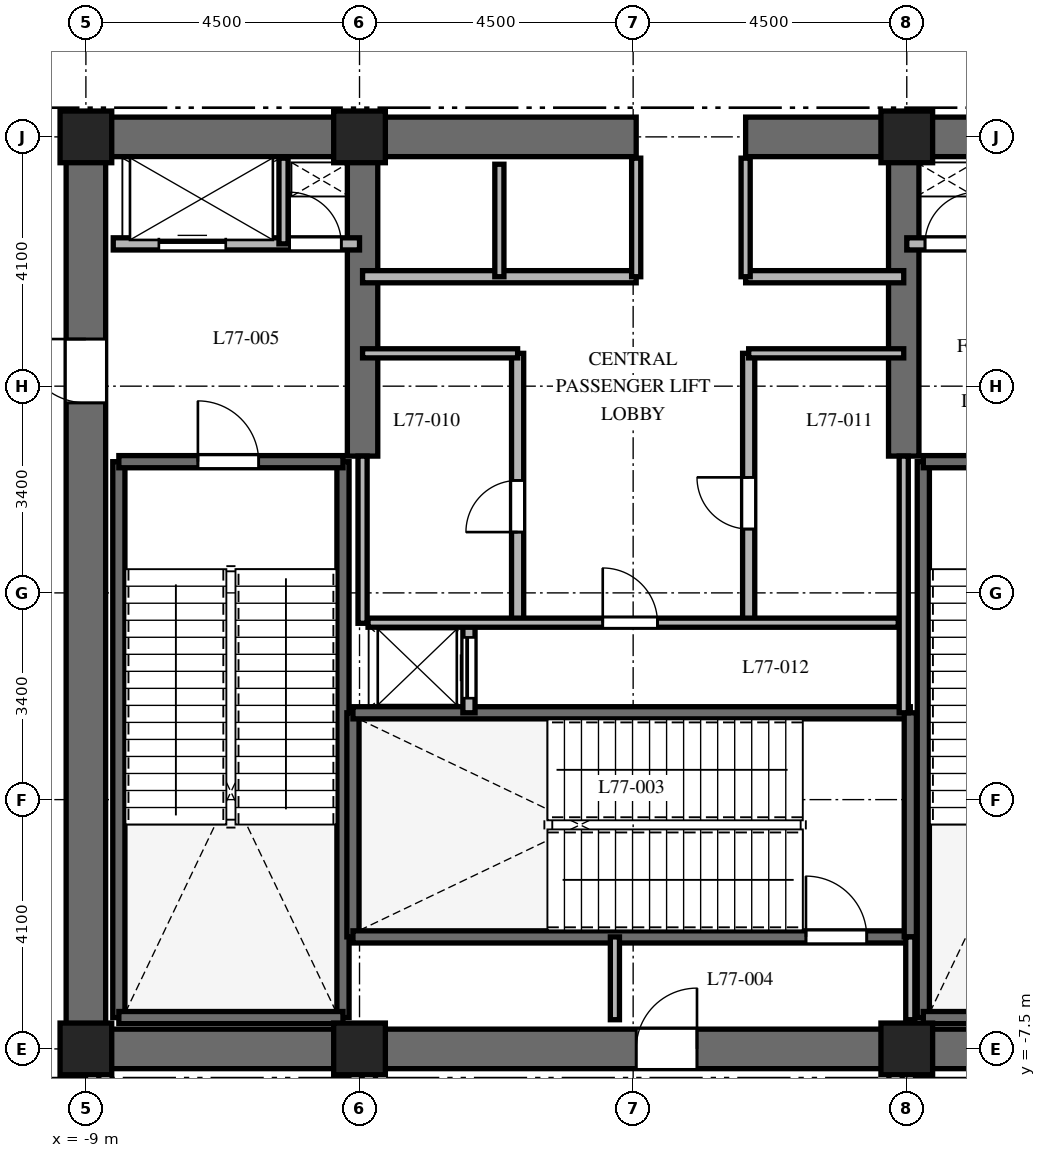
"""IFC4 building model, lengths in metres.
Left out: names, types, materials, properties, quantities, classifications, styles, units other than length and angle.
Written with IfcOpenShell. Run it as: python <this file> out.ifc"""

import sys

from ifc_helpers import new_model, si_unit, direction, frame, frame_2d, origin, origin_2d, place, context, subcontext, project, spatial, rectangle, extrude, element, fill, save


model = new_model("IFC4")
c1 = context("Model", 3, precision=1e-05, world=origin(), true_north=direction((0.0, 1.0)))
c2 = subcontext(c1, "Body", "Model", "MODEL_VIEW")
j1 = project(units=[si_unit("LENGTHUNIT", "METRE"), si_unit("PLANEANGLEUNIT", "RADIAN")], contexts=[c1])
p1 = place(None, origin())
s1 = spatial("IfcSite", under=j1, at=p1, CompositionType="ELEMENT")
p2 = place(p1, origin())
s2 = spatial("IfcBuilding", under=s1, at=p2, CompositionType="ELEMENT")
p3 = place(p2, frame((0.0, 0.0, 310.4)))
s3 = spatial("IfcBuildingStorey", under=s2, at=p3, CompositionType="ELEMENT", Elevation=310.4)
p4 = place(p3, frame((-9.325, -7.5, 0.0), z_axis=(0.0, 0.0, 1.0), x_axis=(1.0, 0.0, 0.0)))
e1 = element("IfcWall", 1, at=p4, inside=s3, PredefinedType="SHEAR", context=c2, shape_type="SweptSolid", body=[
    extrude(rectangle(XDim=18.65, YDim=0.65, at=frame_2d((9.325, 0.0))), origin(), (0.0, 0.0, 1.0), 5.5),
])
p5 = place(p4, frame((9.375, 0.0, 0.0)))
e2 = element("IfcOpeningElement", 2, at=p5, cuts=e1, PredefinedType="OPENING", context=c2, shape_type="SweptSolid", body=[
    extrude(rectangle(XDim=1.0, YDim=2.15, at=frame_2d((0.5, 1.075))), frame((0.0, 0.335, 0.0), z_axis=(0.0, -1.0, 0.0), x_axis=(1.0, 0.0, 0.0)), (0.0, 0.0, 1.0), 0.67),
])
p6 = place(p3, frame((-9.325, 7.5, 0.0), z_axis=(0.0, 0.0, 1.0), x_axis=(1.0, 0.0, 0.0)))
e3 = element("IfcWall", 3, at=p6, inside=s3, PredefinedType="SHEAR", context=c2, shape_type="SweptSolid", body=[
    extrude(rectangle(XDim=9.375, YDim=0.65, at=frame_2d((4.688, 0.0))), origin(), (0.0, 0.0, 1.0), 5.5),
])
p7 = place(p3, frame((1.85, 7.5, 0.0), z_axis=(0.0, 0.0, 1.0), x_axis=(1.0, 0.0, 0.0)))
e4 = element("IfcWall", 4, at=p7, inside=s3, PredefinedType="SHEAR", context=c2, shape_type="SweptSolid", body=[
    extrude(rectangle(XDim=7.475, YDim=0.65, at=frame_2d((3.737, 0.0))), origin(), (0.0, 0.0, 1.0), 5.5),
])
p8 = place(p3, frame((-9.0, -7.175, 0.0), z_axis=(0.0, 0.0, 1.0), x_axis=(0.0, 1.0, 0.0)))
e5 = element("IfcWall", 5, at=p8, inside=s3, PredefinedType="SHEAR", context=c2, shape_type="SweptSolid", body=[
    extrude(rectangle(XDim=14.35, YDim=0.65, at=frame_2d((7.175, 0.0))), origin(), (0.0, 0.0, 1.0), 5.5),
])
p9 = place(p8, frame((10.3, 0.0, 0.0)))
e6 = element("IfcOpeningElement", 6, at=p9, cuts=e5, PredefinedType="OPENING", context=c2, shape_type="SweptSolid", body=[
    extrude(rectangle(XDim=1.05, YDim=2.15, at=frame_2d((0.525, 1.075))), frame((0.0, 0.335, 0.0), z_axis=(0.0, -1.0, 0.0), x_axis=(1.0, 0.0, 0.0)), (0.0, 0.0, 1.0), 0.67),
])
for number, where, z_axis, x_axis in (
    (7, (-4.45, 2.25, 0.0), (0.0, 0.0, 1.0), (0.0, 1.0, 0.0)),
    (8, (4.45, 2.25, 0.0), (0.0, 0.0, 1.0), (0.0, 1.0, 0.0)),
):
    element("IfcWall", number, at=place(p3, frame(where, z_axis=z_axis, x_axis=x_axis)), inside=s3, PredefinedType="SHEAR", context=c2, shape_type="SweptSolid", body=[
        extrude(rectangle(XDim=4.925, YDim=0.5, at=frame_2d((2.462, 0.0))), origin(), (0.0, 0.0, 1.0), 5.5),
    ])
for number, where, z_axis, x_axis in (
    (9, (-8.458, -6.985, 0.0), (0.0, 0.0, 1.0), (0.0, 1.0, 0.0)),
    (10, (-4.772, -6.985, 0.0), (0.0, 0.0, 1.0), (0.0, 1.0, 0.0)),
):
    element("IfcWall", number, at=place(p3, frame(where, z_axis=z_axis, x_axis=x_axis)), inside=s3, PredefinedType="SHEAR", context=c2, shape_type="SweptSolid", body=[
        extrude(rectangle(XDim=9.143, YDim=0.2, at=frame_2d((4.572, 0.0))), origin(), (0.0, 0.0, 1.0), 5.5),
    ])
p10 = place(p3, frame((-8.458, -6.985, 0.0), z_axis=(0.0, 0.0, 1.0), x_axis=(1.0, 0.0, 0.0)))
e11 = element("IfcWall", 11, at=p10, inside=s3, PredefinedType="SHEAR", context=c2, shape_type="SweptSolid", body=[
    extrude(rectangle(XDim=3.686, YDim=0.2, at=frame_2d((1.843, 0.0))), origin(), (0.0, 0.0, 1.0), 5.5),
])
p11 = place(p3, frame((-8.458, 2.158, 0.0), z_axis=(0.0, 0.0, 1.0), x_axis=(1.0, 0.0, 0.0)))
e12 = element("IfcWall", 12, at=p11, inside=s3, PredefinedType="SHEAR", context=c2, shape_type="SweptSolid", body=[
    extrude(rectangle(XDim=3.686, YDim=0.2, at=frame_2d((1.843, 0.0))), origin(), (0.0, 0.0, 1.0), 5.5),
])
p12 = place(p11, frame((1.3, 0.0, 0.0)))
e13 = element("IfcOpeningElement", 13, at=p12, cuts=e12, PredefinedType="OPENING", context=c2, shape_type="SweptSolid", body=[
    extrude(rectangle(XDim=1.0, YDim=2.15, at=frame_2d((0.5, 1.075))), frame((0.0, 0.11, 0.0), z_axis=(0.0, -1.0, 0.0), x_axis=(1.0, 0.0, 0.0)), (0.0, 0.0, 1.0), 0.22),
])
p13 = place(p3, frame((4.772, -6.985, 0.0), z_axis=(0.0, 0.0, 1.0), x_axis=(0.0, 1.0, 0.0)))
e14 = element("IfcWall", 14, at=p13, inside=s3, PredefinedType="SHEAR", context=c2, shape_type="SweptSolid", body=[
    extrude(rectangle(XDim=9.143, YDim=0.2, at=frame_2d((4.572, 0.0))), origin(), (0.0, 0.0, 1.0), 5.5),
])
p14 = place(p3, frame((4.772, -6.985, 0.0), z_axis=(0.0, 0.0, 1.0), x_axis=(1.0, 0.0, 0.0)))
e15 = element("IfcWall", 15, at=p14, inside=s3, PredefinedType="SHEAR", context=c2, shape_type="SweptSolid", body=[
    extrude(rectangle(XDim=3.686, YDim=0.2, at=frame_2d((1.843, 0.0))), origin(), (0.0, 0.0, 1.0), 5.5),
])
p15 = place(p3, frame((4.772, 2.158, 0.0), z_axis=(0.0, 0.0, 1.0), x_axis=(1.0, 0.0, 0.0)))
e16 = element("IfcWall", 16, at=p15, inside=s3, PredefinedType="SHEAR", context=c2, shape_type="SweptSolid", body=[
    extrude(rectangle(XDim=3.686, YDim=0.2, at=frame_2d((1.843, 0.0))), origin(), (0.0, 0.0, 1.0), 5.5),
])
p16 = place(p15, frame((1.35, 0.0, 0.0)))
e17 = element("IfcOpeningElement", 17, at=p16, cuts=e16, PredefinedType="OPENING", context=c2, shape_type="SweptSolid", body=[
    extrude(rectangle(XDim=1.0, YDim=2.15, at=frame_2d((0.5, 1.075))), frame((0.0, 0.11, 0.0), z_axis=(0.0, -1.0, 0.0), x_axis=(1.0, 0.0, 0.0)), (0.0, 0.0, 1.0), 0.22),
])
p17 = place(p3, frame((-4.608, -5.658, 0.0), z_axis=(0.0, 0.0, 1.0), x_axis=(0.0, 1.0, 0.0)))
e18 = element("IfcWall", 18, at=p17, inside=s3, PredefinedType="SHEAR", context=c2, shape_type="SweptSolid", body=[
    extrude(rectangle(XDim=3.686, YDim=0.2, at=frame_2d((1.843, 0.0))), origin(), (0.0, 0.0, 1.0), 5.5),
])
p18 = place(p3, frame((-4.608, -5.658, 0.0), z_axis=(0.0, 0.0, 1.0), x_axis=(1.0, 0.0, 0.0)))
e19 = element("IfcWall", 19, at=p18, inside=s3, PredefinedType="SHEAR", context=c2, shape_type="SweptSolid", body=[
    extrude(rectangle(XDim=9.166, YDim=0.2, at=frame_2d((4.583, 0.0))), origin(), (0.0, 0.0, 1.0), 5.5),
])
p19 = place(p18, frame((7.45, 0.0, 0.0)))
e20 = element("IfcOpeningElement", 20, at=p19, cuts=e19, PredefinedType="OPENING", context=c2, shape_type="SweptSolid", body=[
    extrude(rectangle(XDim=1.0, YDim=2.15, at=frame_2d((0.5, 1.075))), frame((0.0, 0.11, 0.0), z_axis=(0.0, -1.0, 0.0), x_axis=(1.0, 0.0, 0.0)), (0.0, 0.0, 1.0), 0.22),
])
p20 = place(p3, frame((-4.608, -1.972, 0.0), z_axis=(0.0, 0.0, 1.0), x_axis=(1.0, 0.0, 0.0)))
e21 = element("IfcWall", 21, at=p20, inside=s3, PredefinedType="SHEAR", context=c2, shape_type="SweptSolid", body=[
    extrude(rectangle(XDim=9.166, YDim=0.2, at=frame_2d((4.583, 0.0))), origin(), (0.0, 0.0, 1.0), 5.5),
])
p21 = place(p3, frame((4.558, -5.658, 0.0), z_axis=(0.0, 0.0, 1.0), x_axis=(0.0, 1.0, 0.0)))
e22 = element("IfcWall", 22, at=p21, inside=s3, PredefinedType="SHEAR", context=c2, shape_type="SweptSolid", body=[
    extrude(rectangle(XDim=3.686, YDim=0.2, at=frame_2d((1.843, 0.0))), origin(), (0.0, 0.0, 1.0), 5.5),
])
for number, where, z_axis, x_axis in (
    (23, (-9.0, -7.5, 0.0), (0.0, 0.0, 1.0), (1.0, 0.0, 0.0)),
    (24, (-4.5, -7.5, 0.0), (0.0, 0.0, 1.0), (1.0, 0.0, 0.0)),
    (25, (4.5, -7.5, 0.0), (0.0, 0.0, 1.0), (1.0, 0.0, 0.0)),
    (26, (4.5, 7.5, 0.0), (0.0, 0.0, 1.0), (1.0, 0.0, 0.0)),
    (27, (-4.5, 7.5, 0.0), (0.0, 0.0, 1.0), (1.0, 0.0, 0.0)),
    (28, (-9.0, 7.5, 0.0), (0.0, 0.0, 1.0), (1.0, 0.0, 0.0)),
):
    element("IfcColumn", number, at=place(p3, frame(where, z_axis=z_axis, x_axis=x_axis)), inside=s3, PredefinedType="COLUMN", context=c2, shape_type="SweptSolid", body=[
        extrude(rectangle(XDim=0.85, YDim=0.85, at=origin_2d()), origin(), (0.0, 0.0, 1.0), 5.5),
    ])
for number, where, z_axis, x_axis in (
    (29, (-0.3, -7.02, 0.0), (0.0, 0.0, 1.0), (0.0, 1.0, 0.0)),
    (30, (4.558, -7.02, 0.0), (0.0, 0.0, 1.0), (0.0, 1.0, 0.0)),
):
    element("IfcWall", number, at=place(p3, frame(where, z_axis=z_axis, x_axis=x_axis)), inside=s3, PredefinedType="PARTITIONING", context=c2, shape_type="SweptSolid", body=[
        extrude(rectangle(XDim=1.362, YDim=0.15, at=frame_2d((0.681, 0.0))), origin(), (0.0, 0.0, 1.0), 5.18),
    ])
p22 = place(p3, frame((-8.55, 5.74, 0.0), z_axis=(0.0, 0.0, 1.0), x_axis=(1.0, 0.0, 0.0)))
e31 = element("IfcWall", 31, at=p22, inside=s3, PredefinedType="PARTITIONING", context=c2, shape_type="SweptSolid", body=[
    extrude(rectangle(XDim=4.05, YDim=0.2, at=frame_2d((2.025, 0.0))), origin(), (0.0, 0.0, 1.0), 5.18),
])
p23 = place(p22, frame((0.75, 0.0, 0.0)))
e32 = element("IfcOpeningElement", 32, at=p23, cuts=e31, PredefinedType="OPENING", context=c2, shape_type="SweptSolid", body=[
    extrude(rectangle(XDim=1.1, YDim=2.2, at=frame_2d((0.55, 1.1))), frame((0.0, 0.11, 0.0), z_axis=(0.0, -1.0, 0.0), x_axis=(1.0, 0.0, 0.0)), (0.0, 0.0, 1.0), 0.22),
])
p24 = place(p22, frame((2.9, 0.0, 0.0)))
e33 = element("IfcOpeningElement", 33, at=p24, cuts=e31, PredefinedType="OPENING", context=c2, shape_type="SweptSolid", body=[
    extrude(rectangle(XDim=0.85, YDim=2.03, at=frame_2d((0.425, 1.015))), frame((0.0, 0.11, 0.0), z_axis=(0.0, -1.0, 0.0), x_axis=(1.0, 0.0, 0.0)), (0.0, 0.0, 1.0), 0.22),
])
p25 = place(p3, frame((-5.75, 5.74, 0.0), z_axis=(0.0, 0.0, 1.0), x_axis=(0.0, 1.0, 0.0)))
e34 = element("IfcWall", 34, at=p25, inside=s3, PredefinedType="PARTITIONING", context=c2, shape_type="SweptSolid", body=[
    extrude(rectangle(XDim=1.41, YDim=0.15, at=frame_2d((0.705, 0.0))), origin(), (0.0, 0.0, 1.0), 5.18),
])
p26 = place(p3, frame((4.5, 5.74, 0.0), z_axis=(0.0, 0.0, 1.0), x_axis=(1.0, 0.0, 0.0)))
e35 = element("IfcWall", 35, at=p26, inside=s3, PredefinedType="PARTITIONING", context=c2, shape_type="SweptSolid", body=[
    extrude(rectangle(XDim=4.05, YDim=0.2, at=frame_2d((2.025, 0.0))), origin(), (0.0, 0.0, 1.0), 5.18),
])
p27 = place(p26, frame((0.3, 0.0, 0.0)))
e36 = element("IfcOpeningElement", 36, at=p27, cuts=e35, PredefinedType="OPENING", context=c2, shape_type="SweptSolid", body=[
    extrude(rectangle(XDim=0.85, YDim=2.03, at=frame_2d((0.425, 1.015))), frame((0.0, 0.11, 0.0), z_axis=(0.0, -1.0, 0.0), x_axis=(1.0, 0.0, 0.0)), (0.0, 0.0, 1.0), 0.22),
])
p28 = place(p26, frame((2.15, 0.0, 0.0)))
e37 = element("IfcOpeningElement", 37, at=p28, cuts=e35, PredefinedType="OPENING", context=c2, shape_type="SweptSolid", body=[
    extrude(rectangle(XDim=1.1, YDim=2.2, at=frame_2d((0.55, 1.1))), frame((0.0, 0.11, 0.0), z_axis=(0.0, -1.0, 0.0), x_axis=(1.0, 0.0, 0.0)), (0.0, 0.0, 1.0), 0.22),
])
p29 = place(p3, frame((-2.7, -1.972, 0.0), z_axis=(0.0, 0.0, 1.0), x_axis=(0.0, 1.0, 0.0)))
e38 = element("IfcWall", 38, at=p29, inside=s3, PredefinedType="PARTITIONING", context=c2, shape_type="SweptSolid", body=[
    extrude(rectangle(XDim=1.472, YDim=0.2, at=frame_2d((0.736, 0.0))), origin(), (0.0, 0.0, 1.0), 5.18),
])
p30 = place(p29, frame((0.24, 0.0, 0.0)))
e39 = element("IfcOpeningElement", 39, at=p30, cuts=e38, PredefinedType="OPENING", context=c2, shape_type="SweptSolid", body=[
    extrude(rectangle(XDim=1.0, YDim=2.2, at=frame_2d((0.5, 1.1))), frame((0.0, 0.11, 0.0), z_axis=(0.0, -1.0, 0.0), x_axis=(1.0, 0.0, 0.0)), (0.0, 0.0, 1.0), 0.22),
])
p31 = place(p3, frame((-4.45, 5.2, 0.0), z_axis=(0.0, 0.0, 1.0), x_axis=(1.0, 0.0, 0.0)))
e40 = element("IfcWall", 40, at=p31, inside=s3, PredefinedType="PARTITIONING", context=c2, shape_type="SweptSolid", body=[
    extrude(rectangle(XDim=4.5, YDim=0.2, at=frame_2d((2.25, 0.0))), origin(), (0.0, 0.0, 1.0), 5.18),
])
p32 = place(p3, frame((1.85, 5.2, 0.0), z_axis=(0.0, 0.0, 1.0), x_axis=(1.0, 0.0, 0.0)))
e41 = element("IfcWall", 41, at=p32, inside=s3, PredefinedType="PARTITIONING", context=c2, shape_type="SweptSolid", body=[
    extrude(rectangle(XDim=2.6, YDim=0.2, at=frame_2d((1.3, 0.0))), origin(), (0.0, 0.0, 1.0), 5.18),
])
p33 = place(p3, frame((-2.2, 5.2, 0.0), z_axis=(0.0, 0.0, 1.0), x_axis=(0.0, 1.0, 0.0)))
e42 = element("IfcWall", 42, at=p33, inside=s3, PredefinedType="PARTITIONING", context=c2, shape_type="SweptSolid", body=[
    extrude(rectangle(XDim=1.85, YDim=0.15, at=frame_2d((0.925, 0.0))), origin(), (0.0, 0.0, 1.0), 5.18),
])
for number, where, z_axis, x_axis in (
    (43, (0.05, 5.2, 0.0), (0.0, 0.0, 1.0), (0.0, 1.0, 0.0)),
    (44, (1.85, 5.2, 0.0), (0.0, 0.0, 1.0), (0.0, 1.0, 0.0)),
):
    element("IfcWall", number, at=place(p3, frame(where, z_axis=z_axis, x_axis=x_axis)), inside=s3, PredefinedType="PARTITIONING", context=c2, shape_type="SweptSolid", body=[
        extrude(rectangle(XDim=1.95, YDim=0.15, at=frame_2d((0.975, 0.0))), origin(), (0.0, 0.0, 1.0), 5.18),
    ])
p34 = place(p3, frame((-4.45, -0.5, 0.0), z_axis=(0.0, 0.0, 1.0), x_axis=(0.0, 1.0, 0.0)))
e45 = element("IfcWall", 45, at=p34, inside=s3, PredefinedType="PARTITIONING", context=c2, shape_type="SweptSolid", body=[
    extrude(rectangle(XDim=2.75, YDim=0.15, at=frame_2d((1.375, 0.0))), origin(), (0.0, 0.0, 1.0), 5.18),
])
p35 = place(p3, frame((4.45, -1.972, 0.0), z_axis=(0.0, 0.0, 1.0), x_axis=(0.0, 1.0, 0.0)))
e46 = element("IfcWall", 46, at=p35, inside=s3, PredefinedType="PARTITIONING", context=c2, shape_type="SweptSolid", body=[
    extrude(rectangle(XDim=4.222, YDim=0.15, at=frame_2d((2.111, 0.0))), origin(), (0.0, 0.0, 1.0), 5.18),
])
p36 = place(p3, frame((-1.9, -0.5, 0.0), z_axis=(0.0, 0.0, 1.0), x_axis=(0.0, 1.0, 0.0)))
e47 = element("IfcWall", 47, at=p36, inside=s3, PredefinedType="PARTITIONING", context=c2, shape_type="SweptSolid", body=[
    extrude(rectangle(XDim=4.44, YDim=0.2, at=frame_2d((2.22, 0.0))), origin(), (0.0, 0.0, 1.0), 5.18),
])
p37 = place(p36, frame((1.5, 0.0, 0.0)))
e48 = element("IfcOpeningElement", 48, at=p37, cuts=e47, PredefinedType="OPENING", context=c2, shape_type="SweptSolid", body=[
    extrude(rectangle(XDim=0.85, YDim=2.03, at=frame_2d((0.425, 1.015))), frame((0.0, 0.11, 0.0), z_axis=(0.0, -1.0, 0.0), x_axis=(1.0, 0.0, 0.0)), (0.0, 0.0, 1.0), 0.22),
])
p38 = place(p3, frame((-4.45, 3.94, 0.0), z_axis=(0.0, 0.0, 1.0), x_axis=(1.0, 0.0, 0.0)))
e49 = element("IfcWall", 49, at=p38, inside=s3, PredefinedType="PARTITIONING", context=c2, shape_type="SweptSolid", body=[
    extrude(rectangle(XDim=2.55, YDim=0.15, at=frame_2d((1.275, 0.0))), origin(), (0.0, 0.0, 1.0), 5.18),
])
p39 = place(p3, frame((1.9, -0.5, 0.0), z_axis=(0.0, 0.0, 1.0), x_axis=(0.0, 1.0, 0.0)))
e50 = element("IfcWall", 50, at=p39, inside=s3, PredefinedType="PARTITIONING", context=c2, shape_type="SweptSolid", body=[
    extrude(rectangle(XDim=4.44, YDim=0.2, at=frame_2d((2.22, 0.0))), origin(), (0.0, 0.0, 1.0), 5.18),
])
p40 = place(p39, frame((1.55, 0.0, 0.0)))
e51 = element("IfcOpeningElement", 51, at=p40, cuts=e50, PredefinedType="OPENING", context=c2, shape_type="SweptSolid", body=[
    extrude(rectangle(XDim=0.85, YDim=2.03, at=frame_2d((0.425, 1.015))), frame((0.0, 0.11, 0.0), z_axis=(0.0, -1.0, 0.0), x_axis=(1.0, 0.0, 0.0)), (0.0, 0.0, 1.0), 0.22),
])
p41 = place(p3, frame((1.9, 3.94, 0.0), z_axis=(0.0, 0.0, 1.0), x_axis=(1.0, 0.0, 0.0)))
e52 = element("IfcWall", 52, at=p41, inside=s3, PredefinedType="PARTITIONING", context=c2, shape_type="SweptSolid", body=[
    extrude(rectangle(XDim=2.55, YDim=0.15, at=frame_2d((1.275, 0.0))), origin(), (0.0, 0.0, 1.0), 5.18),
])
p42 = place(p3, frame((-4.36, -0.49, 0.0), z_axis=(0.0, 0.0, 1.0), x_axis=(1.0, 0.0, 0.0)))
e53 = element("IfcWall", 53, at=p42, inside=s3, PredefinedType="PARTITIONING", context=c2, shape_type="SweptSolid", body=[
    extrude(rectangle(XDim=8.72, YDim=0.15, at=frame_2d((4.36, 0.0))), origin(), (0.0, 0.0, 1.0), 5.18),
])
p43 = place(p42, frame((3.86, 0.0, 0.0)))
e54 = element("IfcOpeningElement", 54, at=p43, cuts=e53, PredefinedType="OPENING", context=c2, shape_type="SweptSolid", body=[
    extrude(rectangle(XDim=0.9, YDim=2.03, at=frame_2d((0.45, 1.015))), frame((0.0, 0.085, 0.0), z_axis=(0.0, -1.0, 0.0), x_axis=(1.0, 0.0, 0.0)), (0.0, 0.0, 1.0), 0.17),
])
p44 = place(p12, origin())
e55 = element("IfcDoor", 55, at=p44, inside=s3, OperationType="SINGLE_SWING_LEFT", PredefinedType="DOOR", context=c2, shape_type="SweptSolid", body=[
    extrude(rectangle(XDim=1.0, YDim=2.15, at=frame_2d((0.5, 1.075))), frame((0.0, 0.025, 0.0), z_axis=(0.0, -1.0, 0.0), x_axis=(1.0, 0.0, 0.0)), (0.0, 0.0, 1.0), 0.05),
])
fill(e13, e55)
p45 = place(p19, origin())
e56 = element("IfcDoor", 56, at=p45, inside=s3, OperationType="SINGLE_SWING_LEFT", PredefinedType="DOOR", context=c2, shape_type="SweptSolid", body=[
    extrude(rectangle(XDim=1.0, YDim=2.15, at=frame_2d((0.5, 1.075))), frame((0.0, 0.025, 0.0), z_axis=(0.0, -1.0, 0.0), x_axis=(1.0, 0.0, 0.0)), (0.0, 0.0, 1.0), 0.05),
])
fill(e20, e56)
p46 = place(p5, origin())
e57 = element("IfcDoor", 57, at=p46, inside=s3, OperationType="SINGLE_SWING_RIGHT", PredefinedType="DOOR", context=c2, shape_type="SweptSolid", body=[
    extrude(rectangle(XDim=1.0, YDim=2.15, at=frame_2d((0.5, 1.075))), frame((0.0, 0.025, 0.0), z_axis=(0.0, -1.0, 0.0), x_axis=(1.0, 0.0, 0.0)), (0.0, 0.0, 1.0), 0.05),
])
fill(e2, e57)
p47 = place(p9, origin())
e58 = element("IfcDoor", 58, at=p47, inside=s3, OperationType="SINGLE_SWING_RIGHT", PredefinedType="DOOR", context=c2, shape_type="SweptSolid", body=[
    extrude(rectangle(XDim=1.05, YDim=2.15, at=frame_2d((0.525, 1.075))), frame((0.0, 0.025, 0.0), z_axis=(0.0, -1.0, 0.0), x_axis=(1.0, 0.0, 0.0)), (0.0, 0.0, 1.0), 0.05),
])
fill(e6, e58)
p48 = place(p23, origin())
e59 = element("IfcDoor", 59, at=p48, inside=s3, OperationType="SLIDING_TO_LEFT", PredefinedType="DOOR", context=c2, shape_type="SweptSolid", body=[
    extrude(rectangle(XDim=1.1, YDim=2.2, at=frame_2d((0.55, 1.1))), frame((0.0, 0.025, 0.0), z_axis=(0.0, -1.0, 0.0), x_axis=(1.0, 0.0, 0.0)), (0.0, 0.0, 1.0), 0.05),
])
fill(e32, e59)
p49 = place(p24, origin())
e60 = element("IfcDoor", 60, at=p49, inside=s3, OperationType="SINGLE_SWING_LEFT", PredefinedType="DOOR", context=c2, shape_type="SweptSolid", body=[
    extrude(rectangle(XDim=0.85, YDim=2.03, at=frame_2d((0.425, 1.015))), frame((0.0, 0.025, 0.0), z_axis=(0.0, -1.0, 0.0), x_axis=(1.0, 0.0, 0.0)), (0.0, 0.0, 1.0), 0.05),
])
fill(e33, e60)
p50 = place(p27, origin())
e61 = element("IfcDoor", 61, at=p50, inside=s3, OperationType="SINGLE_SWING_RIGHT", PredefinedType="DOOR", context=c2, shape_type="SweptSolid", body=[
    extrude(rectangle(XDim=0.85, YDim=2.03, at=frame_2d((0.425, 1.015))), frame((0.0, 0.025, 0.0), z_axis=(0.0, -1.0, 0.0), x_axis=(1.0, 0.0, 0.0)), (0.0, 0.0, 1.0), 0.05),
])
fill(e36, e61)
p51 = place(p30, origin())
e62 = element("IfcDoor", 62, at=p51, inside=s3, OperationType="SLIDING_TO_LEFT", PredefinedType="DOOR", context=c2, shape_type="SweptSolid", body=[
    extrude(rectangle(XDim=1.0, YDim=2.2, at=frame_2d((0.5, 1.1))), frame((0.0, 0.025, 0.0), z_axis=(0.0, -1.0, 0.0), x_axis=(1.0, 0.0, 0.0)), (0.0, 0.0, 1.0), 0.05),
])
fill(e39, e62)
p52 = place(p37, origin())
e63 = element("IfcDoor", 63, at=p52, inside=s3, OperationType="SINGLE_SWING_LEFT", PredefinedType="DOOR", context=c2, shape_type="SweptSolid", body=[
    extrude(rectangle(XDim=0.85, YDim=2.03, at=frame_2d((0.425, 1.015))), frame((0.0, 0.025, 0.0), z_axis=(0.0, -1.0, 0.0), x_axis=(1.0, 0.0, 0.0)), (0.0, 0.0, 1.0), 0.05),
])
fill(e48, e63)
p53 = place(p40, origin())
e64 = element("IfcDoor", 64, at=p53, inside=s3, OperationType="SINGLE_SWING_RIGHT", PredefinedType="DOOR", context=c2, shape_type="SweptSolid", body=[
    extrude(rectangle(XDim=0.85, YDim=2.03, at=frame_2d((0.425, 1.015))), frame((0.0, 0.025, 0.0), z_axis=(0.0, -1.0, 0.0), x_axis=(1.0, 0.0, 0.0)), (0.0, 0.0, 1.0), 0.05),
])
fill(e51, e64)
p54 = place(p43, origin())
e65 = element("IfcDoor", 65, at=p54, inside=s3, OperationType="SINGLE_SWING_LEFT", PredefinedType="DOOR", context=c2, shape_type="SweptSolid", body=[
    extrude(rectangle(XDim=0.9, YDim=2.03, at=frame_2d((0.45, 1.015))), frame((0.0, 0.025, 0.0), z_axis=(0.0, -1.0, 0.0), x_axis=(1.0, 0.0, 0.0)), (0.0, 0.0, 1.0), 0.05),
])
fill(e54, e65)
save(model, sys.argv[1])
